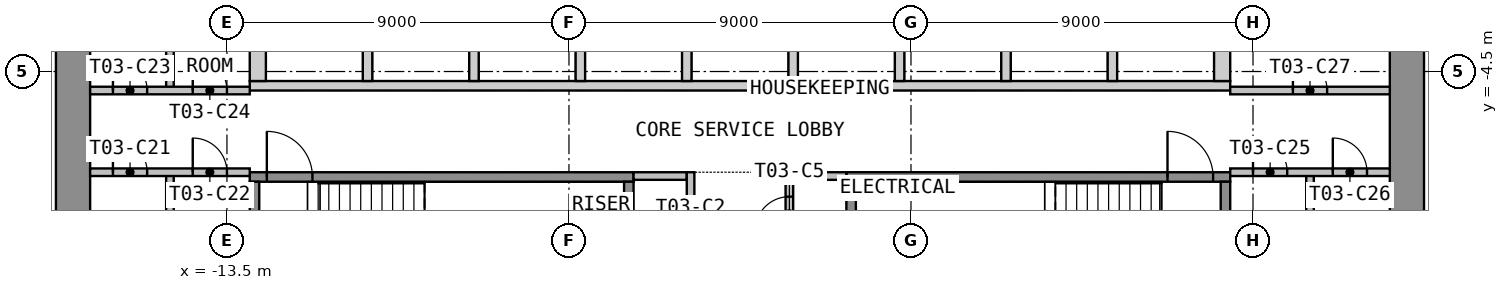
"""IFC4 building model, lengths in metres.
Left out: names, types, materials, properties, quantities, classifications, styles, units other than length and angle.
Written with IfcOpenShell. Run it as: python <this file> out.ifc"""

import sys

from ifc_helpers import new_model, si_unit, direction, frame, frame_2d, origin, place, context, subcontext, project, spatial, polyline, rectangle, outline, extrude, element, fill, save


model = new_model("IFC4")
c1 = context("Model", 3, precision=1e-05, world=origin(), true_north=direction((0.0, 1.0)))
c2 = subcontext(c1, "Body", "Model", "MODEL_VIEW")
j1 = project(units=[si_unit("LENGTHUNIT", "METRE"), si_unit("PLANEANGLEUNIT", "RADIAN")], contexts=[c1])
p1 = place(None, origin())
s1 = spatial("IfcSite", under=j1, at=p1, CompositionType="ELEMENT")
p2 = place(p1, origin())
s2 = spatial("IfcBuilding", under=s1, at=p2, CompositionType="ELEMENT")
p3 = place(p2, frame((0.0, 0.0, 53.4)))
s3 = spatial("IfcBuildingStorey", under=s2, at=p3, CompositionType="ELEMENT", Elevation=53.4)
p4 = place(p3, frame((-17.55, -12.6, 0.0), z_axis=(0.0, 0.0, 1.0), x_axis=(0.0, 1.0, 0.0)))
e1 = element("IfcWall", 1, at=p4, inside=s3, PredefinedType="SHEAR", context=c2, shape_type="SweptSolid", body=[
    extrude(rectangle(XDim=25.2, YDim=0.9, at=frame_2d((12.6, 0.0))), origin(), (0.0, 0.0, 1.0), 3.525),
])
p5 = place(p4, frame((11.4, 0.0, 0.0)))
e2 = element("IfcOpeningElement", 2, at=p5, cuts=e1, PredefinedType="OPENING", context=c2, shape_type="SweptSolid", body=[
    extrude(rectangle(XDim=2.4, YDim=2.1, at=frame_2d((1.2, 1.05))), frame((0.0, 0.46, 0.0), z_axis=(0.0, -1.0, 0.0), x_axis=(1.0, 0.0, 0.0)), (0.0, 0.0, 1.0), 0.92),
])
p6 = place(p3, frame((17.55, -12.6, 0.0), z_axis=(0.0, 0.0, 1.0), x_axis=(0.0, 1.0, 0.0)))
e3 = element("IfcWall", 3, at=p6, inside=s3, PredefinedType="SHEAR", context=c2, shape_type="SweptSolid", body=[
    extrude(rectangle(XDim=25.2, YDim=0.9, at=frame_2d((12.6, 0.0))), origin(), (0.0, 0.0, 1.0), 3.525),
])
p7 = place(p6, frame((11.4, 0.0, 0.0)))
e4 = element("IfcOpeningElement", 4, at=p7, cuts=e3, PredefinedType="OPENING", context=c2, shape_type="SweptSolid", body=[
    extrude(rectangle(XDim=2.4, YDim=2.1, at=frame_2d((1.2, 1.05))), frame((0.0, 0.46, 0.0), z_axis=(0.0, -1.0, 0.0), x_axis=(1.0, 0.0, 0.0)), (0.0, 0.0, 1.0), 0.92),
])
p8 = place(p3, origin())
e5 = element("IfcWall", 5, at=p8, inside=s3, PredefinedType="SHEAR", context=c2, shape_type="SweptSolid", body=[
    extrude(outline(polyline([(-12.9, -5.0), (12.9, -5.0), (12.9, -4.75), (-12.9, -4.75), (-12.9, -5.0)])), origin(), (0.0, 0.0, 1.0), 3.525),
])
p9 = place(p3, origin())
e6 = element("IfcWall", 6, at=p9, inside=s3, PredefinedType="SHEAR", context=c2, shape_type="SweptSolid", body=[
    extrude(outline(polyline([(-12.9, -4.75), (-12.475, -4.75), (-12.475, -2.05), (-12.9, -2.05), (-12.9, -4.75)])), origin(), (0.0, 0.0, 1.0), 3.525),
])
p10 = place(p3, origin())
e7 = element("IfcWall", 7, at=p10, inside=s3, PredefinedType="SHEAR", context=c2, shape_type="SweptSolid", body=[
    extrude(outline(polyline([(-9.925, -4.75), (-9.675, -4.75), (-9.675, -2.05), (-9.925, -2.05), (-9.925, -4.75)])), origin(), (0.0, 0.0, 1.0), 3.525),
])
p11 = place(p3, origin())
e8 = element("IfcWall", 8, at=p11, inside=s3, PredefinedType="SHEAR", context=c2, shape_type="SweptSolid", body=[
    extrude(outline(polyline([(-7.125, -4.75), (-6.875, -4.75), (-6.875, -2.05), (-7.125, -2.05), (-7.125, -4.75)])), origin(), (0.0, 0.0, 1.0), 3.525),
])
p12 = place(p3, origin())
e9 = element("IfcWall", 9, at=p12, inside=s3, PredefinedType="SHEAR", context=c2, shape_type="SweptSolid", body=[
    extrude(outline(polyline([(-4.325, -4.75), (-4.075, -4.75), (-4.075, -2.05), (-4.325, -2.05), (-4.325, -4.75)])), origin(), (0.0, 0.0, 1.0), 3.525),
])
p13 = place(p3, origin())
e10 = element("IfcWall", 10, at=p13, inside=s3, PredefinedType="SHEAR", context=c2, shape_type="SweptSolid", body=[
    extrude(outline(polyline([(-1.525, -4.75), (-1.275, -4.75), (-1.275, -2.05), (-1.525, -2.05), (-1.525, -4.75)])), origin(), (0.0, 0.0, 1.0), 3.525),
])
p14 = place(p3, origin())
e11 = element("IfcWall", 11, at=p14, inside=s3, PredefinedType="SHEAR", context=c2, shape_type="SweptSolid", body=[
    extrude(outline(polyline([(1.275, -4.75), (1.525, -4.75), (1.525, -2.05), (1.275, -2.05), (1.275, -4.75)])), origin(), (0.0, 0.0, 1.0), 3.525),
])
p15 = place(p3, origin())
e12 = element("IfcWall", 12, at=p15, inside=s3, PredefinedType="SHEAR", context=c2, shape_type="SweptSolid", body=[
    extrude(outline(polyline([(4.075, -4.75), (4.325, -4.75), (4.325, -2.05), (4.075, -2.05), (4.075, -4.75)])), origin(), (0.0, 0.0, 1.0), 3.525),
])
p16 = place(p3, origin())
e13 = element("IfcWall", 13, at=p16, inside=s3, PredefinedType="SHEAR", context=c2, shape_type="SweptSolid", body=[
    extrude(outline(polyline([(6.875, -4.75), (7.125, -4.75), (7.125, -2.05), (6.875, -2.05), (6.875, -4.75)])), origin(), (0.0, 0.0, 1.0), 3.525),
])
p17 = place(p3, origin())
e14 = element("IfcWall", 14, at=p17, inside=s3, PredefinedType="SHEAR", context=c2, shape_type="SweptSolid", body=[
    extrude(outline(polyline([(9.675, -4.75), (9.925, -4.75), (9.925, -2.05), (9.675, -2.05), (9.675, -4.75)])), origin(), (0.0, 0.0, 1.0), 3.525),
])
p18 = place(p3, origin())
e15 = element("IfcWall", 15, at=p18, inside=s3, PredefinedType="SHEAR", context=c2, shape_type="SweptSolid", body=[
    extrude(outline(polyline([(12.475, -4.75), (12.9, -4.75), (12.9, -2.05), (12.475, -2.05), (12.475, -4.75)])), origin(), (0.0, 0.0, 1.0), 3.525),
])
p19 = place(p3, frame((-12.9, -7.275, 0.0), z_axis=(0.0, 0.0, 1.0), x_axis=(1.0, 0.0, 0.0)))
e16 = element("IfcWall", 16, at=p19, inside=s3, PredefinedType="SHEAR", context=c2, shape_type="SweptSolid", body=[
    extrude(rectangle(XDim=10.1, YDim=0.25, at=frame_2d((5.05, 0.0))), origin(), (0.0, 0.0, 1.0), 3.525),
])
p20 = place(p19, frame((0.45, 0.0, 0.0)))
e17 = element("IfcOpeningElement", 17, at=p20, cuts=e16, PredefinedType="OPENING", context=c2, shape_type="SweptSolid", body=[
    extrude(rectangle(XDim=1.2, YDim=2.1, at=frame_2d((0.6, 1.05))), frame((0.0, 0.135, 0.0), z_axis=(0.0, -1.0, 0.0), x_axis=(1.0, 0.0, 0.0)), (0.0, 0.0, 1.0), 0.27),
])
for number, where, z_axis, x_axis in (
    (18, (-12.775, -10.65, 0.0), (0.0, 0.0, 1.0), (0.0, 1.0, 0.0)),
    (19, (-2.925, -10.65, 0.0), (0.0, 0.0, 1.0), (0.0, 1.0, 0.0)),
):
    element("IfcWall", number, at=place(p3, frame(where, z_axis=z_axis, x_axis=x_axis)), inside=s3, PredefinedType="SHEAR", context=c2, shape_type="SweptSolid", body=[
        extrude(rectangle(XDim=3.25, YDim=0.25, at=frame_2d((1.625, 0.0))), origin(), (0.0, 0.0, 1.0), 3.525),
    ])
p21 = place(p3, frame((2.8, -7.275, 0.0), z_axis=(0.0, 0.0, 1.0), x_axis=(1.0, 0.0, 0.0)))
e20 = element("IfcWall", 20, at=p21, inside=s3, PredefinedType="SHEAR", context=c2, shape_type="SweptSolid", body=[
    extrude(rectangle(XDim=10.1, YDim=0.25, at=frame_2d((5.05, 0.0))), origin(), (0.0, 0.0, 1.0), 3.525),
])
p22 = place(p21, frame((8.45, 0.0, 0.0)))
e21 = element("IfcOpeningElement", 21, at=p22, cuts=e20, PredefinedType="OPENING", context=c2, shape_type="SweptSolid", body=[
    extrude(rectangle(XDim=1.2, YDim=2.1, at=frame_2d((0.6, 1.05))), frame((0.0, 0.135, 0.0), z_axis=(0.0, -1.0, 0.0), x_axis=(1.0, 0.0, 0.0)), (0.0, 0.0, 1.0), 0.27),
])
for number, where, z_axis, x_axis in (
    (22, (2.925, -10.65, 0.0), (0.0, 0.0, 1.0), (0.0, 1.0, 0.0)),
    (23, (12.775, -10.65, 0.0), (0.0, 0.0, 1.0), (0.0, 1.0, 0.0)),
):
    element("IfcWall", number, at=place(p3, frame(where, z_axis=z_axis, x_axis=x_axis)), inside=s3, PredefinedType="SHEAR", context=c2, shape_type="SweptSolid", body=[
        extrude(rectangle(XDim=3.25, YDim=0.25, at=frame_2d((1.625, 0.0))), origin(), (0.0, 0.0, 1.0), 3.525),
    ])
for number, where, z_axis, x_axis in (
    (24, (-2.8, -7.25, 0.0), (0.0, 0.0, 1.0), (1.0, 0.0, 0.0)),
    (25, (1.4, -7.25, 0.0), (0.0, 0.0, 1.0), (1.0, 0.0, 0.0)),
):
    element("IfcWall", number, at=place(p3, frame(where, z_axis=z_axis, x_axis=x_axis)), inside=s3, PredefinedType="PARTITIONING", context=c2, shape_type="SweptSolid", body=[
        extrude(rectangle(XDim=1.4, YDim=0.2, at=frame_2d((0.7, 0.0))), origin(), (0.0, 0.0, 1.0), 3.525),
    ])
p23 = place(p3, frame((-1.3, -12.6, 0.0), z_axis=(0.0, 0.0, 1.0), x_axis=(0.0, 1.0, 0.0)))
e26 = element("IfcWall", 26, at=p23, inside=s3, PredefinedType="PARTITIONING", context=c2, shape_type="SweptSolid", body=[
    extrude(rectangle(XDim=5.45, YDim=0.2, at=frame_2d((2.725, 0.0))), origin(), (0.0, 0.0, 1.0), 3.525),
])
p24 = place(p23, frame((0.337, 0.0, 0.0)))
e27 = element("IfcOpeningElement", 27, at=p24, cuts=e26, PredefinedType="OPENING", context=c2, shape_type="SweptSolid", body=[
    extrude(rectangle(XDim=0.9, YDim=2.1, at=frame_2d((0.45, 1.05))), frame((0.0, 0.11, 0.0), z_axis=(0.0, -1.0, 0.0), x_axis=(1.0, 0.0, 0.0)), (0.0, 0.0, 1.0), 0.22),
])
p25 = place(p23, frame((2.962, 0.0, 0.0)))
e28 = element("IfcOpeningElement", 28, at=p25, cuts=e26, PredefinedType="OPENING", context=c2, shape_type="SweptSolid", body=[
    extrude(rectangle(XDim=0.9, YDim=2.1, at=frame_2d((0.45, 1.05))), frame((0.0, 0.11, 0.0), z_axis=(0.0, -1.0, 0.0), x_axis=(1.0, 0.0, 0.0)), (0.0, 0.0, 1.0), 0.22),
])
p26 = place(p3, frame((1.3, -12.6, 0.0), z_axis=(0.0, 0.0, 1.0), x_axis=(0.0, 1.0, 0.0)))
e29 = element("IfcWall", 29, at=p26, inside=s3, PredefinedType="PARTITIONING", context=c2, shape_type="SweptSolid", body=[
    extrude(rectangle(XDim=5.45, YDim=0.2, at=frame_2d((2.725, 0.0))), origin(), (0.0, 0.0, 1.0), 3.525),
])
p27 = place(p26, frame((0.416, 0.0, 0.0)))
e30 = element("IfcOpeningElement", 30, at=p27, cuts=e29, PredefinedType="OPENING", context=c2, shape_type="SweptSolid", body=[
    extrude(rectangle(XDim=0.9, YDim=2.1, at=frame_2d((0.45, 1.05))), frame((0.0, 0.11, 0.0), z_axis=(0.0, -1.0, 0.0), x_axis=(1.0, 0.0, 0.0)), (0.0, 0.0, 1.0), 0.22),
])
p28 = place(p26, frame((2.149, 0.0, 0.0)))
e31 = element("IfcOpeningElement", 31, at=p28, cuts=e29, PredefinedType="OPENING", context=c2, shape_type="SweptSolid", body=[
    extrude(rectangle(XDim=0.9, YDim=2.1, at=frame_2d((0.45, 1.05))), frame((0.0, 0.11, 0.0), z_axis=(0.0, -1.0, 0.0), x_axis=(1.0, 0.0, 0.0)), (0.0, 0.0, 1.0), 0.22),
])
p29 = place(p26, frame((3.907, 0.0, 0.0)))
e32 = element("IfcOpeningElement", 32, at=p29, cuts=e29, PredefinedType="OPENING", context=c2, shape_type="SweptSolid", body=[
    extrude(rectangle(XDim=0.9, YDim=2.1, at=frame_2d((0.45, 1.05))), frame((0.0, 0.11, 0.0), z_axis=(0.0, -1.0, 0.0), x_axis=(1.0, 0.0, 0.0)), (0.0, 0.0, 1.0), 0.22),
])
p30 = place(p3, frame((-15.0, -12.6, 0.0), z_axis=(0.0, 0.0, 1.0), x_axis=(0.0, 1.0, 0.0)))
e33 = element("IfcWall", 33, at=p30, inside=s3, PredefinedType="PARTITIONING", context=c2, shape_type="SweptSolid", body=[
    extrude(rectangle(XDim=5.45, YDim=0.2, at=frame_2d((2.725, 0.0))), origin(), (0.0, 0.0, 1.0), 3.525),
])
p31 = place(p3, frame((-17.1, -7.15, 0.0), z_axis=(0.0, 0.0, 1.0), x_axis=(1.0, 0.0, 0.0)))
e34 = element("IfcWall", 34, at=p31, inside=s3, PredefinedType="PARTITIONING", context=c2, shape_type="SweptSolid", body=[
    extrude(rectangle(XDim=4.2, YDim=0.2, at=frame_2d((2.1, 0.0))), origin(), (0.0, 0.0, 1.0), 3.525),
])
p32 = place(p31, frame((0.6, 0.0, 0.0)))
e35 = element("IfcOpeningElement", 35, at=p32, cuts=e34, PredefinedType="OPENING", context=c2, shape_type="SweptSolid", body=[
    extrude(rectangle(XDim=0.9, YDim=2.1, at=frame_2d((0.45, 1.05))), frame((0.0, 0.11, 0.0), z_axis=(0.0, -1.0, 0.0), x_axis=(1.0, 0.0, 0.0)), (0.0, 0.0, 1.0), 0.22),
])
p33 = place(p31, frame((2.7, 0.0, 0.0)))
e36 = element("IfcOpeningElement", 36, at=p33, cuts=e34, PredefinedType="OPENING", context=c2, shape_type="SweptSolid", body=[
    extrude(rectangle(XDim=0.9, YDim=2.1, at=frame_2d((0.45, 1.05))), frame((0.0, 0.11, 0.0), z_axis=(0.0, -1.0, 0.0), x_axis=(1.0, 0.0, 0.0)), (0.0, 0.0, 1.0), 0.22),
])
p34 = place(p3, frame((-15.0, -5.0, 0.0), z_axis=(0.0, 0.0, 1.0), x_axis=(0.0, 1.0, 0.0)))
e37 = element("IfcWall", 37, at=p34, inside=s3, PredefinedType="PARTITIONING", context=c2, shape_type="SweptSolid", body=[
    extrude(rectangle(XDim=3.2, YDim=0.2, at=frame_2d((1.6, 0.0))), origin(), (0.0, 0.0, 1.0), 3.525),
])
p35 = place(p3, frame((-17.1, -5.0, 0.0), z_axis=(0.0, 0.0, 1.0), x_axis=(1.0, 0.0, 0.0)))
e38 = element("IfcWall", 38, at=p35, inside=s3, PredefinedType="PARTITIONING", context=c2, shape_type="SweptSolid", body=[
    extrude(rectangle(XDim=4.2, YDim=0.2, at=frame_2d((2.1, 0.0))), origin(), (0.0, 0.0, 1.0), 3.525),
])
p36 = place(p35, frame((0.6, 0.0, 0.0)))
e39 = element("IfcOpeningElement", 39, at=p36, cuts=e38, PredefinedType="OPENING", context=c2, shape_type="SweptSolid", body=[
    extrude(rectangle(XDim=0.9, YDim=2.1, at=frame_2d((0.45, 1.05))), frame((0.0, 0.11, 0.0), z_axis=(0.0, -1.0, 0.0), x_axis=(1.0, 0.0, 0.0)), (0.0, 0.0, 1.0), 0.22),
])
p37 = place(p35, frame((2.7, 0.0, 0.0)))
e40 = element("IfcOpeningElement", 40, at=p37, cuts=e38, PredefinedType="OPENING", context=c2, shape_type="SweptSolid", body=[
    extrude(rectangle(XDim=0.9, YDim=2.1, at=frame_2d((0.45, 1.05))), frame((0.0, 0.11, 0.0), z_axis=(0.0, -1.0, 0.0), x_axis=(1.0, 0.0, 0.0)), (0.0, 0.0, 1.0), 0.22),
])
p38 = place(p3, frame((15.0, -12.6, 0.0), z_axis=(0.0, 0.0, 1.0), x_axis=(0.0, 1.0, 0.0)))
e41 = element("IfcWall", 41, at=p38, inside=s3, PredefinedType="PARTITIONING", context=c2, shape_type="SweptSolid", body=[
    extrude(rectangle(XDim=5.45, YDim=0.2, at=frame_2d((2.725, 0.0))), origin(), (0.0, 0.0, 1.0), 3.525),
])
p39 = place(p3, frame((12.9, -7.15, 0.0), z_axis=(0.0, 0.0, 1.0), x_axis=(1.0, 0.0, 0.0)))
e42 = element("IfcWall", 42, at=p39, inside=s3, PredefinedType="PARTITIONING", context=c2, shape_type="SweptSolid", body=[
    extrude(rectangle(XDim=4.2, YDim=0.2, at=frame_2d((2.1, 0.0))), origin(), (0.0, 0.0, 1.0), 3.525),
])
p40 = place(p39, frame((0.6, 0.0, 0.0)))
e43 = element("IfcOpeningElement", 43, at=p40, cuts=e42, PredefinedType="OPENING", context=c2, shape_type="SweptSolid", body=[
    extrude(rectangle(XDim=0.9, YDim=2.1, at=frame_2d((0.45, 1.05))), frame((0.0, 0.11, 0.0), z_axis=(0.0, -1.0, 0.0), x_axis=(1.0, 0.0, 0.0)), (0.0, 0.0, 1.0), 0.22),
])
p41 = place(p39, frame((2.7, 0.0, 0.0)))
e44 = element("IfcOpeningElement", 44, at=p41, cuts=e42, PredefinedType="OPENING", context=c2, shape_type="SweptSolid", body=[
    extrude(rectangle(XDim=0.9, YDim=2.1, at=frame_2d((0.45, 1.05))), frame((0.0, 0.11, 0.0), z_axis=(0.0, -1.0, 0.0), x_axis=(1.0, 0.0, 0.0)), (0.0, 0.0, 1.0), 0.22),
])
p42 = place(p3, frame((12.9, -5.0, 0.0), z_axis=(0.0, 0.0, 1.0), x_axis=(1.0, 0.0, 0.0)))
e45 = element("IfcWall", 45, at=p42, inside=s3, PredefinedType="PARTITIONING", context=c2, shape_type="SweptSolid", body=[
    extrude(rectangle(XDim=4.2, YDim=0.2, at=frame_2d((2.1, 0.0))), origin(), (0.0, 0.0, 1.0), 3.525),
])
p43 = place(p42, frame((1.65, 0.0, 0.0)))
e46 = element("IfcOpeningElement", 46, at=p43, cuts=e45, PredefinedType="OPENING", context=c2, shape_type="SweptSolid", body=[
    extrude(rectangle(XDim=0.9, YDim=2.1, at=frame_2d((0.45, 1.05))), frame((0.0, 0.11, 0.0), z_axis=(0.0, -1.0, 0.0), x_axis=(1.0, 0.0, 0.0)), (0.0, 0.0, 1.0), 0.22),
])
p44 = place(p20, origin())
e47 = element("IfcDoor", 47, at=p44, inside=s3, OperationType="SINGLE_SWING_LEFT", PredefinedType="DOOR", context=c2, shape_type="SweptSolid", body=[
    extrude(rectangle(XDim=1.2, YDim=2.1, at=frame_2d((0.6, 1.05))), frame((0.0, 0.025, 0.0), z_axis=(0.0, -1.0, 0.0), x_axis=(1.0, 0.0, 0.0)), (0.0, 0.0, 1.0), 0.05),
])
fill(e17, e47)
p45 = place(p22, origin())
e48 = element("IfcDoor", 48, at=p45, inside=s3, OperationType="SINGLE_SWING_LEFT", PredefinedType="DOOR", context=c2, shape_type="SweptSolid", body=[
    extrude(rectangle(XDim=1.2, YDim=2.1, at=frame_2d((0.6, 1.05))), frame((0.0, 0.025, 0.0), z_axis=(0.0, -1.0, 0.0), x_axis=(1.0, 0.0, 0.0)), (0.0, 0.0, 1.0), 0.05),
])
fill(e21, e48)
p46 = place(p29, origin())
e49 = element("IfcDoor", 49, at=p46, inside=s3, OperationType="SINGLE_SWING_LEFT", PredefinedType="DOOR", context=c2, shape_type="SweptSolid", body=[
    extrude(rectangle(XDim=0.9, YDim=2.1, at=frame_2d((0.45, 1.05))), frame((0.0, 0.025, 0.0), z_axis=(0.0, -1.0, 0.0), x_axis=(1.0, 0.0, 0.0)), (0.0, 0.0, 1.0), 0.05),
])
fill(e32, e49)
p47 = place(p32, origin())
e50 = element("IfcDoor", 50, at=p47, inside=s3, OperationType="SINGLE_SWING_LEFT", PredefinedType="DOOR", context=c2, shape_type="SweptSolid", body=[
    extrude(rectangle(XDim=0.9, YDim=2.1, at=frame_2d((0.45, 1.05))), frame((0.0, 0.025, 0.0), z_axis=(0.0, -1.0, 0.0), x_axis=(1.0, 0.0, 0.0)), (0.0, 0.0, 1.0), 0.05),
])
fill(e35, e50)
p48 = place(p33, origin())
e51 = element("IfcDoor", 51, at=p48, inside=s3, OperationType="SINGLE_SWING_LEFT", PredefinedType="DOOR", context=c2, shape_type="SweptSolid", body=[
    extrude(rectangle(XDim=0.9, YDim=2.1, at=frame_2d((0.45, 1.05))), frame((0.0, 0.025, 0.0), z_axis=(0.0, -1.0, 0.0), x_axis=(1.0, 0.0, 0.0)), (0.0, 0.0, 1.0), 0.05),
])
fill(e36, e51)
p49 = place(p36, origin())
e52 = element("IfcDoor", 52, at=p49, inside=s3, OperationType="SINGLE_SWING_LEFT", PredefinedType="DOOR", context=c2, shape_type="SweptSolid", body=[
    extrude(rectangle(XDim=0.9, YDim=2.1, at=frame_2d((0.45, 1.05))), frame((0.0, 0.025, 0.0), z_axis=(0.0, -1.0, 0.0), x_axis=(1.0, 0.0, 0.0)), (0.0, 0.0, 1.0), 0.05),
])
fill(e39, e52)
p50 = place(p37, origin())
e53 = element("IfcDoor", 53, at=p50, inside=s3, OperationType="SINGLE_SWING_LEFT", PredefinedType="DOOR", context=c2, shape_type="SweptSolid", body=[
    extrude(rectangle(XDim=0.9, YDim=2.1, at=frame_2d((0.45, 1.05))), frame((0.0, 0.025, 0.0), z_axis=(0.0, -1.0, 0.0), x_axis=(1.0, 0.0, 0.0)), (0.0, 0.0, 1.0), 0.05),
])
fill(e40, e53)
p51 = place(p40, origin())
e54 = element("IfcDoor", 54, at=p51, inside=s3, OperationType="SINGLE_SWING_LEFT", PredefinedType="DOOR", context=c2, shape_type="SweptSolid", body=[
    extrude(rectangle(XDim=0.9, YDim=2.1, at=frame_2d((0.45, 1.05))), frame((0.0, 0.025, 0.0), z_axis=(0.0, -1.0, 0.0), x_axis=(1.0, 0.0, 0.0)), (0.0, 0.0, 1.0), 0.05),
])
fill(e43, e54)
p52 = place(p41, origin())
e55 = element("IfcDoor", 55, at=p52, inside=s3, OperationType="SINGLE_SWING_LEFT", PredefinedType="DOOR", context=c2, shape_type="SweptSolid", body=[
    extrude(rectangle(XDim=0.9, YDim=2.1, at=frame_2d((0.45, 1.05))), frame((0.0, 0.025, 0.0), z_axis=(0.0, -1.0, 0.0), x_axis=(1.0, 0.0, 0.0)), (0.0, 0.0, 1.0), 0.05),
])
fill(e44, e55)
p53 = place(p43, origin())
e56 = element("IfcDoor", 56, at=p53, inside=s3, OperationType="SINGLE_SWING_LEFT", PredefinedType="DOOR", context=c2, shape_type="SweptSolid", body=[
    extrude(rectangle(XDim=0.9, YDim=2.1, at=frame_2d((0.45, 1.05))), frame((0.0, 0.025, 0.0), z_axis=(0.0, -1.0, 0.0), x_axis=(1.0, 0.0, 0.0)), (0.0, 0.0, 1.0), 0.05),
])
fill(e46, e56)
save(model, sys.argv[1])
